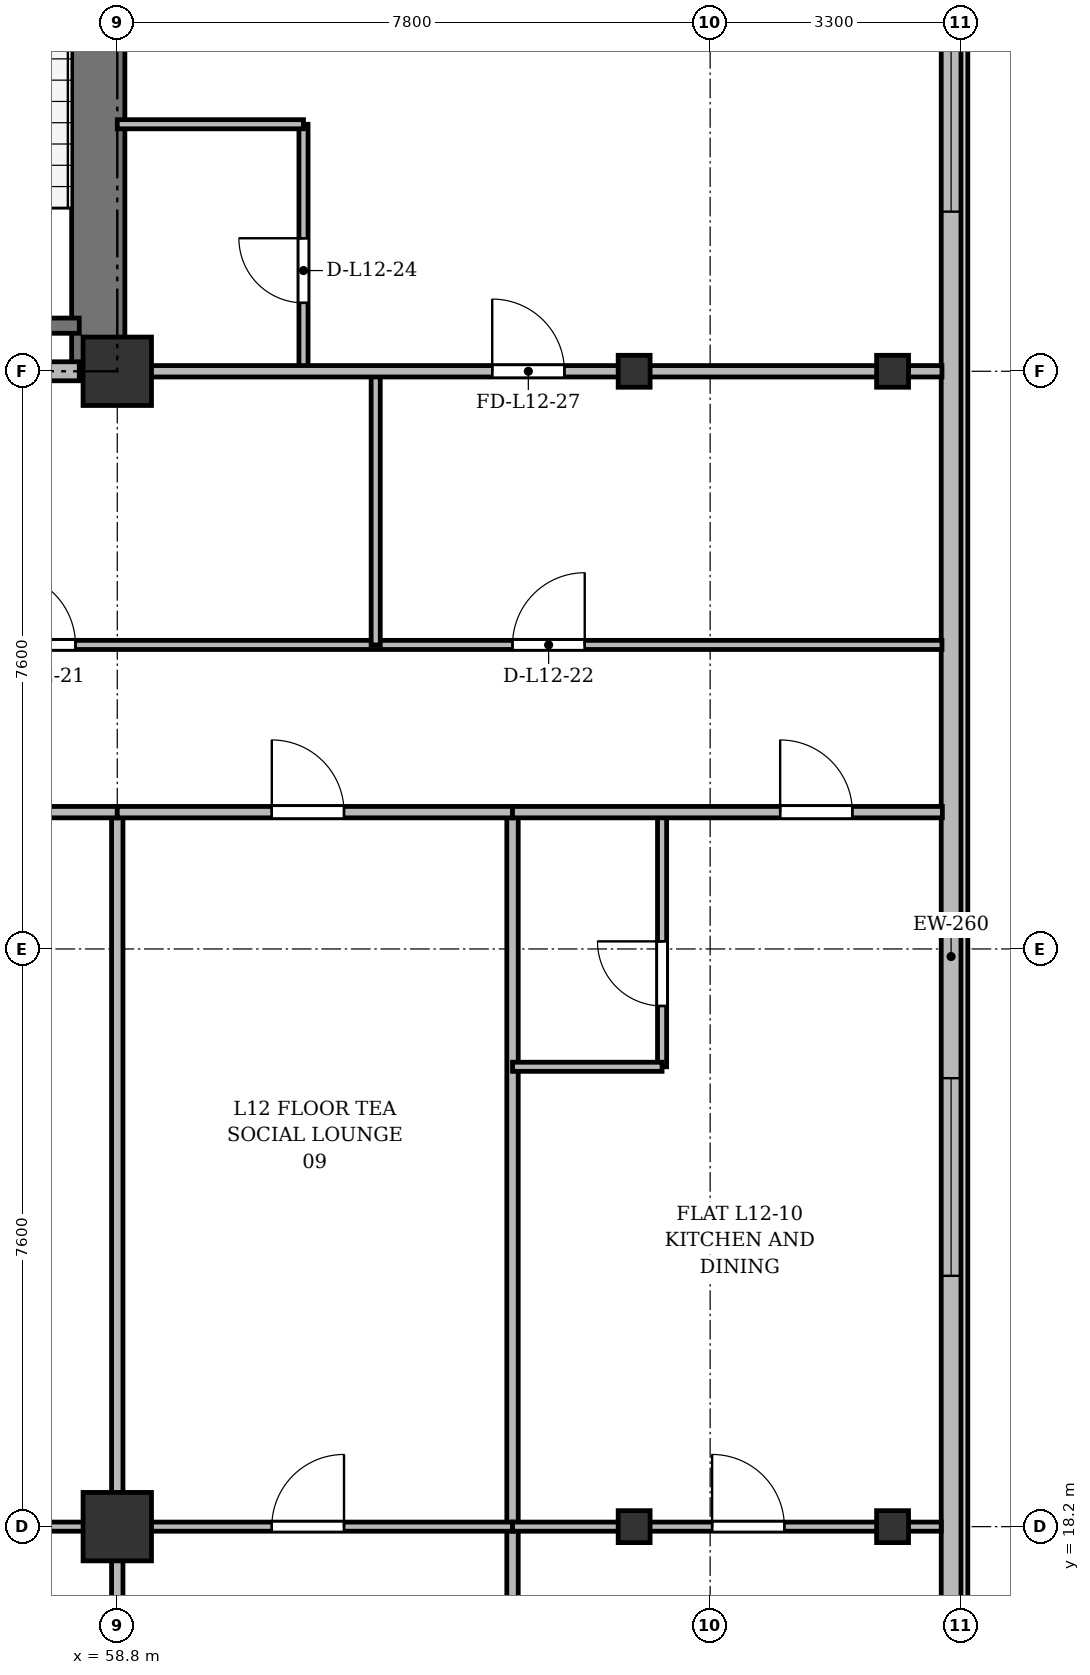
"""IFC4 building model, lengths in metres.
Left out: names, types, materials, properties, quantities, classifications, styles, units other than length and angle.
Written with IfcOpenShell. Run it as: python <this file> out.ifc"""

import sys

from ifc_helpers import new_model, si_unit, direction, frame, frame_2d, origin, origin_2d, place, context, subcontext, project, spatial, rectangle, i_section, extrude, source, transform, mapped, element, fill, save


model = new_model("IFC4")
c1 = context("Model", 3, precision=1e-05, world=origin(), true_north=direction((0.0, 1.0)))
c2 = subcontext(c1, "Body", "Model", "MODEL_VIEW")
j1 = project(units=[si_unit("LENGTHUNIT", "METRE"), si_unit("PLANEANGLEUNIT", "RADIAN")], contexts=[c1])
p1 = place(None, origin())
s1 = spatial("IfcSite", under=j1, at=p1, CompositionType="ELEMENT")
p2 = place(p1, origin())
s2 = spatial("IfcBuilding", under=s1, at=p2, CompositionType="ELEMENT")
p3 = place(p2, frame((0.0, 0.0, 48.7)))
s3 = spatial("IfcBuildingStorey", under=s2, at=p3, CompositionType="ELEMENT", Elevation=48.7)
m1 = source(origin(), c2, "Body", "SweptSolid", [
    extrude(rectangle(XDim=0.9, YDim=0.9, at=origin_2d()), origin(), (0.0, 0.0, 1.0), 3.6),
])
for number, where, z_axis, x_axis in (
    (1, (58.8, 18.2, 0.0), (0.0, 0.0, 1.0), (1.0, 0.0, 0.0)),
    (2, (58.8, 33.4, 0.0), (0.0, 0.0, 1.0), (1.0, 0.0, 0.0)),
):
    element("IfcColumn", number, at=place(p3, frame(where, z_axis=z_axis, x_axis=x_axis)), inside=s3, PredefinedType="COLUMN", context=c2, shape_type="MappedRepresentation", body=[
        mapped(m1, transform((0.0, 0.0, 0.0), x_axis=(1.0, 0.0, 0.0), y_axis=(0.0, 1.0, 0.0), z_axis=(0.0, 0.0, 1.0), scale=1.0)),
    ])
m2 = source(origin(), c2, "Body", "SweptSolid", [
    extrude(i_section(OverallWidth=0.42, OverallDepth=0.42, WebThickness=0.026, FlangeThickness=0.04, at=origin_2d()), origin(), (0.0, 0.0, 1.0), 3.6),
])
for number, where, z_axis, x_axis in (
    (3, (65.6, 18.2, 0.0), (0.0, 0.0, 1.0), (1.0, 0.0, 0.0)),
    (4, (65.6, 33.4, 0.0), (0.0, 0.0, 1.0), (1.0, 0.0, 0.0)),
    (5, (69.0, 18.2, 0.0), (0.0, 0.0, 1.0), (1.0, 0.0, 0.0)),
    (6, (69.0, 33.4, 0.0), (0.0, 0.0, 1.0), (1.0, 0.0, 0.0)),
):
    element("IfcColumn", number, at=place(p3, frame(where, z_axis=z_axis, x_axis=x_axis)), inside=s3, PredefinedType="COLUMN", context=c2, shape_type="MappedRepresentation", body=[
        mapped(m2, transform((0.0, 0.0, 0.0), x_axis=(1.0, 0.0, 0.0), y_axis=(0.0, 1.0, 0.0), z_axis=(0.0, 0.0, 1.0), scale=1.0)),
    ])
p4 = place(p3, frame((69.77, 45.5, 0.0), z_axis=(0.0, 0.0, 1.0), x_axis=(0.0, -1.0, 0.0)))
e7 = element("IfcWall", 7, at=p4, inside=s3, PredefinedType="SOLIDWALL", context=c2, shape_type="SweptSolid", body=[
    extrude(rectangle(XDim=39.6, YDim=0.26, at=frame_2d((19.8, 0.0))), origin(), (0.0, 0.0, 1.0), 3.34),
])
p5 = place(p4, frame((36.95, 0.0, 0.92)))
e8 = element("IfcOpeningElement", 8, at=p5, cuts=e7, PredefinedType="OPENING", context=c2, shape_type="SweptSolid", body=[
    extrude(rectangle(XDim=1.2, YDim=1.65, at=frame_2d((0.6, 0.825))), frame((0.0, 0.14, 0.0), z_axis=(0.0, -1.0, 0.0), x_axis=(1.0, 0.0, 0.0)), (0.0, 0.0, 1.0), 0.28),
])
p6 = place(p4, frame((32.8, 0.0, 0.92)))
e9 = element("IfcOpeningElement", 9, at=p6, cuts=e7, PredefinedType="OPENING", context=c2, shape_type="SweptSolid", body=[
    extrude(rectangle(XDim=2.6, YDim=1.9, at=frame_2d((1.3, 0.95))), frame((0.0, 0.14, 0.0), z_axis=(0.0, -1.0, 0.0), x_axis=(1.0, 0.0, 0.0)), (0.0, 0.0, 1.0), 0.28),
])
p7 = place(p4, frame((28.6, 0.0, 0.92)))
e10 = element("IfcOpeningElement", 10, at=p7, cuts=e7, PredefinedType="OPENING", context=c2, shape_type="SweptSolid", body=[
    extrude(rectangle(XDim=2.6, YDim=1.9, at=frame_2d((1.3, 0.95))), frame((0.0, 0.14, 0.0), z_axis=(0.0, -1.0, 0.0), x_axis=(1.0, 0.0, 0.0)), (0.0, 0.0, 1.0), 0.28),
])
p8 = place(p4, frame((21.4, 0.0, 0.92)))
e11 = element("IfcOpeningElement", 11, at=p8, cuts=e7, PredefinedType="OPENING", context=c2, shape_type="SweptSolid", body=[
    extrude(rectangle(XDim=2.6, YDim=1.9, at=frame_2d((1.3, 0.95))), frame((0.0, 0.14, 0.0), z_axis=(0.0, -1.0, 0.0), x_axis=(1.0, 0.0, 0.0)), (0.0, 0.0, 1.0), 0.28),
])
p9 = place(p4, frame((7.4, 0.0, 0.92)))
e12 = element("IfcOpeningElement", 12, at=p9, cuts=e7, PredefinedType="OPENING", context=c2, shape_type="SweptSolid", body=[
    extrude(rectangle(XDim=2.6, YDim=1.9, at=frame_2d((1.3, 0.95))), frame((0.0, 0.14, 0.0), z_axis=(0.0, -1.0, 0.0), x_axis=(1.0, 0.0, 0.0)), (0.0, 0.0, 1.0), 0.28),
])
p10 = place(p4, frame((4.5, 0.0, 0.92)))
e13 = element("IfcOpeningElement", 13, at=p10, cuts=e7, PredefinedType="OPENING", context=c2, shape_type="SweptSolid", body=[
    extrude(rectangle(XDim=1.2, YDim=1.65, at=frame_2d((0.6, 0.825))), frame((0.0, 0.14, 0.0), z_axis=(0.0, -1.0, 0.0), x_axis=(1.0, 0.0, 0.0)), (0.0, 0.0, 1.0), 0.28),
])
p11 = place(p4, frame((1.15, 0.0, 0.92)))
e14 = element("IfcOpeningElement", 14, at=p11, cuts=e7, PredefinedType="OPENING", context=c2, shape_type="SweptSolid", body=[
    extrude(rectangle(XDim=1.2, YDim=1.65, at=frame_2d((0.6, 0.825))), frame((0.0, 0.14, 0.0), z_axis=(0.0, -1.0, 0.0), x_axis=(1.0, 0.0, 0.0)), (0.0, 0.0, 1.0), 0.28),
])
p12 = place(p3, frame((58.55, 33.4, 0.0), z_axis=(0.0, 0.0, 1.0), x_axis=(0.0, 1.0, 0.0)))
e15 = element("IfcWall", 15, at=p12, inside=s3, PredefinedType="SHEAR", context=c2, shape_type="SweptSolid", body=[
    extrude(rectangle(XDim=11.7, YDim=0.7, at=frame_2d((5.85, 0.0))), origin(), (0.0, 0.0, 1.0), 3.34),
])
p13 = place(p3, frame((54.9, 34.0, 0.0), z_axis=(0.0, 0.0, 1.0), x_axis=(1.0, 0.0, 0.0)))
e16 = element("IfcWall", 16, at=p13, inside=s3, PredefinedType="SHEAR", context=c2, shape_type="SweptSolid", body=[
    extrude(rectangle(XDim=3.4, YDim=0.2, at=frame_2d((1.7, 0.0))), origin(), (0.0, 0.0, 1.0), 3.34),
])
p14 = place(p3, frame((47.15, 33.4, 0.0), z_axis=(0.0, 0.0, 1.0), x_axis=(1.0, 0.0, 0.0)))
e17 = element("IfcWall", 17, at=p14, inside=s3, PredefinedType="PARTITIONING", context=c2, shape_type="SweptSolid", body=[
    extrude(rectangle(XDim=11.15, YDim=0.25, at=frame_2d((5.575, 0.0))), origin(), (0.0, 0.0, 1.0), 2.69),
])
p15 = place(p14, frame((0.7, 0.0, 0.0)))
e18 = element("IfcOpeningElement", 18, at=p15, cuts=e17, PredefinedType="OPENING", context=c2, shape_type="SweptSolid", body=[
    extrude(rectangle(XDim=0.95, YDim=2.15, at=frame_2d((0.475, 1.075))), frame((0.0, 0.135, 0.0), z_axis=(0.0, -1.0, 0.0), x_axis=(1.0, 0.0, 0.0)), (0.0, 0.0, 1.0), 0.27),
])
p16 = place(p14, frame((6.0, 0.0, 0.0)))
e19 = element("IfcOpeningElement", 19, at=p16, cuts=e17, PredefinedType="OPENING", context=c2, shape_type="SweptSolid", body=[
    extrude(rectangle(XDim=1.2, YDim=2.15, at=frame_2d((0.6, 1.075))), frame((0.0, 0.135, 0.0), z_axis=(0.0, -1.0, 0.0), x_axis=(1.0, 0.0, 0.0)), (0.0, 0.0, 1.0), 0.27),
])
p17 = place(p3, frame((54.8, 29.8, 0.0), z_axis=(0.0, 0.0, 1.0), x_axis=(1.0, 0.0, 0.0)))
e20 = element("IfcWall", 20, at=p17, inside=s3, PredefinedType="PARTITIONING", context=c2, shape_type="SweptSolid", body=[
    extrude(rectangle(XDim=14.85, YDim=0.12, at=frame_2d((7.425, 0.0))), origin(), (0.0, 0.0, 1.0), 2.752),
])
p18 = place(p17, frame((2.5, 0.0, 0.0)))
e21 = element("IfcOpeningElement", 21, at=p18, cuts=e20, PredefinedType="OPENING", context=c2, shape_type="SweptSolid", body=[
    extrude(rectangle(XDim=0.95, YDim=2.15, at=frame_2d((0.475, 1.075))), frame((0.0, 0.07, 0.0), z_axis=(0.0, -1.0, 0.0), x_axis=(1.0, 0.0, 0.0)), (0.0, 0.0, 1.0), 0.14),
])
p19 = place(p17, frame((9.2, 0.0, 0.0)))
e22 = element("IfcOpeningElement", 22, at=p19, cuts=e20, PredefinedType="OPENING", context=c2, shape_type="SweptSolid", body=[
    extrude(rectangle(XDim=0.95, YDim=2.15, at=frame_2d((0.475, 1.075))), frame((0.0, 0.07, 0.0), z_axis=(0.0, -1.0, 0.0), x_axis=(1.0, 0.0, 0.0)), (0.0, 0.0, 1.0), 0.14),
])
p20 = place(p3, frame((62.2, 29.8, 0.0), z_axis=(0.0, 0.0, 1.0), x_axis=(0.0, 1.0, 0.0)))
e23 = element("IfcWall", 23, at=p20, inside=s3, PredefinedType="PARTITIONING", context=c2, shape_type="SweptSolid", body=[
    extrude(rectangle(XDim=3.6, YDim=0.12, at=frame_2d((1.8, 0.0))), origin(), (0.0, 0.0, 1.0), 2.69),
])
p21 = place(p3, frame((61.25, 33.4, 0.0), z_axis=(0.0, 0.0, 1.0), x_axis=(0.0, 1.0, 0.0)))
e24 = element("IfcWall", 24, at=p21, inside=s3, PredefinedType="PARTITIONING", context=c2, shape_type="SweptSolid", body=[
    extrude(rectangle(XDim=3.25, YDim=0.12, at=frame_2d((1.625, 0.0))), origin(), (0.0, 0.0, 1.0), 2.69),
])
p22 = place(p21, frame((0.9, 0.0, 0.0)))
e25 = element("IfcOpeningElement", 25, at=p22, cuts=e24, PredefinedType="OPENING", context=c2, shape_type="SweptSolid", body=[
    extrude(rectangle(XDim=0.85, YDim=2.1, at=frame_2d((0.425, 1.05))), frame((0.0, 0.07, 0.0), z_axis=(0.0, -1.0, 0.0), x_axis=(1.0, 0.0, 0.0)), (0.0, 0.0, 1.0), 0.14),
])
p23 = place(p3, frame((58.8, 36.65, 0.0), z_axis=(0.0, 0.0, 1.0), x_axis=(1.0, 0.0, 0.0)))
e26 = element("IfcWall", 26, at=p23, inside=s3, PredefinedType="PARTITIONING", context=c2, shape_type="SweptSolid", body=[
    extrude(rectangle(XDim=2.45, YDim=0.12, at=frame_2d((1.225, 0.0))), origin(), (0.0, 0.0, 1.0), 2.752),
])
p24 = place(p3, frame((58.8, 33.4, 0.0), z_axis=(0.0, 0.0, 1.0), x_axis=(1.0, 0.0, 0.0)))
e27 = element("IfcWall", 27, at=p24, inside=s3, PredefinedType="PARTITIONING", context=c2, shape_type="SweptSolid", body=[
    extrude(rectangle(XDim=10.85, YDim=0.15, at=frame_2d((5.425, 0.0))), origin(), (0.0, 0.0, 1.0), 2.69),
])
p25 = place(p24, frame((4.933, 0.0, 0.0)))
e28 = element("IfcOpeningElement", 28, at=p25, cuts=e27, PredefinedType="OPENING", context=c2, shape_type="SweptSolid", body=[
    extrude(rectangle(XDim=0.95, YDim=2.15, at=frame_2d((0.475, 1.075))), frame((0.0, 0.085, 0.0), z_axis=(0.0, -1.0, 0.0), x_axis=(1.0, 0.0, 0.0)), (0.0, 0.0, 1.0), 0.17),
])
p26 = place(p3, frame((58.8, 3.145, 0.0), z_axis=(0.0, 0.0, 1.0), x_axis=(0.0, 1.0, 0.0)))
e29 = element("IfcWall", 29, at=p26, inside=s3, PredefinedType="PARTITIONING", context=c2, shape_type="SweptSolid", body=[
    extrude(rectangle(XDim=24.455, YDim=0.15, at=frame_2d((12.228, 0.0))), origin(), (0.0, 0.0, 1.0), 2.752),
])
p27 = place(p3, frame((64.0, 3.145, 0.0), z_axis=(0.0, 0.0, 1.0), x_axis=(0.0, 1.0, 0.0)))
e30 = element("IfcWall", 30, at=p27, inside=s3, PredefinedType="PARTITIONING", context=c2, shape_type="SweptSolid", body=[
    extrude(rectangle(XDim=24.455, YDim=0.15, at=frame_2d((12.228, 0.0))), origin(), (0.0, 0.0, 1.0), 2.69),
])
p28 = place(p3, frame((51.0, 27.6, 0.0), z_axis=(0.0, 0.0, 1.0), x_axis=(1.0, 0.0, 0.0)))
e31 = element("IfcWall", 31, at=p28, inside=s3, PredefinedType="PARTITIONING", context=c2, shape_type="SweptSolid", body=[
    extrude(rectangle(XDim=7.8, YDim=0.15, at=frame_2d((3.9, 0.0))), origin(), (0.0, 0.0, 1.0), 2.752),
])
p29 = place(p28, frame((3.333, 0.0, 0.0)))
e32 = element("IfcOpeningElement", 32, at=p29, cuts=e31, PredefinedType="OPENING", context=c2, shape_type="SweptSolid", body=[
    extrude(rectangle(XDim=0.95, YDim=2.15, at=frame_2d((0.475, 1.075))), frame((0.0, 0.085, 0.0), z_axis=(0.0, -1.0, 0.0), x_axis=(1.0, 0.0, 0.0)), (0.0, 0.0, 1.0), 0.17),
])
p30 = place(p3, frame((51.0, 18.2, 0.0), z_axis=(0.0, 0.0, 1.0), x_axis=(1.0, 0.0, 0.0)))
e33 = element("IfcWall", 33, at=p30, inside=s3, PredefinedType="PARTITIONING", context=c2, shape_type="SweptSolid", body=[
    extrude(rectangle(XDim=7.8, YDim=0.12, at=frame_2d((3.9, 0.0))), origin(), (0.0, 0.0, 1.0), 2.69),
])
p31 = place(p30, frame((3.333, 0.0, 0.0)))
e34 = element("IfcOpeningElement", 34, at=p31, cuts=e33, PredefinedType="OPENING", context=c2, shape_type="SweptSolid", body=[
    extrude(rectangle(XDim=0.95, YDim=2.15, at=frame_2d((0.475, 1.075))), frame((0.0, 0.07, 0.0), z_axis=(0.0, -1.0, 0.0), x_axis=(1.0, 0.0, 0.0)), (0.0, 0.0, 1.0), 0.14),
])
p32 = place(p3, frame((58.8, 27.6, 0.0), z_axis=(0.0, 0.0, 1.0), x_axis=(1.0, 0.0, 0.0)))
e35 = element("IfcWall", 35, at=p32, inside=s3, PredefinedType="PARTITIONING", context=c2, shape_type="SweptSolid", body=[
    extrude(rectangle(XDim=5.2, YDim=0.15, at=frame_2d((2.6, 0.0))), origin(), (0.0, 0.0, 1.0), 2.752),
])
p33 = place(p32, frame((2.033, 0.0, 0.0)))
e36 = element("IfcOpeningElement", 36, at=p33, cuts=e35, PredefinedType="OPENING", context=c2, shape_type="SweptSolid", body=[
    extrude(rectangle(XDim=0.95, YDim=2.15, at=frame_2d((0.475, 1.075))), frame((0.0, 0.085, 0.0), z_axis=(0.0, -1.0, 0.0), x_axis=(1.0, 0.0, 0.0)), (0.0, 0.0, 1.0), 0.17),
])
p34 = place(p3, frame((58.8, 18.2, 0.0), z_axis=(0.0, 0.0, 1.0), x_axis=(1.0, 0.0, 0.0)))
e37 = element("IfcWall", 37, at=p34, inside=s3, PredefinedType="PARTITIONING", context=c2, shape_type="SweptSolid", body=[
    extrude(rectangle(XDim=5.2, YDim=0.12, at=frame_2d((2.6, 0.0))), origin(), (0.0, 0.0, 1.0), 2.69),
])
p35 = place(p34, frame((2.033, 0.0, 0.0)))
e38 = element("IfcOpeningElement", 38, at=p35, cuts=e37, PredefinedType="OPENING", context=c2, shape_type="SweptSolid", body=[
    extrude(rectangle(XDim=0.95, YDim=2.15, at=frame_2d((0.475, 1.075))), frame((0.0, 0.07, 0.0), z_axis=(0.0, -1.0, 0.0), x_axis=(1.0, 0.0, 0.0)), (0.0, 0.0, 1.0), 0.14),
])
p36 = place(p3, frame((64.0, 18.2, 0.0), z_axis=(0.0, 0.0, 1.0), x_axis=(1.0, 0.0, 0.0)))
e39 = element("IfcWall", 39, at=p36, inside=s3, PredefinedType="PARTITIONING", context=c2, shape_type="SweptSolid", body=[
    extrude(rectangle(XDim=5.64, YDim=0.12, at=frame_2d((2.82, 0.0))), origin(), (0.0, 0.0, 1.0), 2.69),
])
p37 = place(p36, frame((2.626, 0.0, 0.0)))
e40 = element("IfcOpeningElement", 40, at=p37, cuts=e39, PredefinedType="OPENING", context=c2, shape_type="SweptSolid", body=[
    extrude(rectangle(XDim=0.95, YDim=2.15, at=frame_2d((0.475, 1.075))), frame((0.0, 0.07, 0.0), z_axis=(0.0, -1.0, 0.0), x_axis=(1.0, 0.0, 0.0)), (0.0, 0.0, 1.0), 0.14),
])
p38 = place(p3, frame((65.968, 24.25, 0.0), z_axis=(0.0, 0.0, 1.0), x_axis=(0.0, 1.0, 0.0)))
e41 = element("IfcWall", 41, at=p38, inside=s3, PredefinedType="PARTITIONING", context=c2, shape_type="SweptSolid", body=[
    extrude(rectangle(XDim=3.35, YDim=0.12, at=frame_2d((1.675, 0.0))), origin(), (0.0, 0.0, 1.0), 2.94),
])
p39 = place(p38, frame((0.8, 0.0, 0.0)))
e42 = element("IfcOpeningElement", 42, at=p39, cuts=e41, PredefinedType="OPENING", context=c2, shape_type="SweptSolid", body=[
    extrude(rectangle(XDim=0.85, YDim=2.1, at=frame_2d((0.425, 1.05))), frame((0.0, 0.07, 0.0), z_axis=(0.0, -1.0, 0.0), x_axis=(1.0, 0.0, 0.0)), (0.0, 0.0, 1.0), 0.14),
])
p40 = place(p3, frame((64.0, 24.25, 0.0), z_axis=(0.0, 0.0, 1.0), x_axis=(1.0, 0.0, 0.0)))
e43 = element("IfcWall", 43, at=p40, inside=s3, PredefinedType="PARTITIONING", context=c2, shape_type="SweptSolid", body=[
    extrude(rectangle(XDim=1.968, YDim=0.12, at=frame_2d((0.984, 0.0))), origin(), (0.0, 0.0, 1.0), 2.752),
])
p41 = place(p3, frame((64.0, 27.6, 0.0), z_axis=(0.0, 0.0, 1.0), x_axis=(1.0, 0.0, 0.0)))
e44 = element("IfcWall", 44, at=p41, inside=s3, PredefinedType="PARTITIONING", context=c2, shape_type="SweptSolid", body=[
    extrude(rectangle(XDim=5.655, YDim=0.15, at=frame_2d((2.828, 0.0))), origin(), (0.0, 0.0, 1.0), 2.752),
])
p42 = place(p41, frame((3.521, 0.0, 0.0)))
e45 = element("IfcOpeningElement", 45, at=p42, cuts=e44, PredefinedType="OPENING", context=c2, shape_type="SweptSolid", body=[
    extrude(rectangle(XDim=0.95, YDim=2.15, at=frame_2d((0.475, 1.075))), frame((0.0, 0.085, 0.0), z_axis=(0.0, -1.0, 0.0), x_axis=(1.0, 0.0, 0.0)), (0.0, 0.0, 1.0), 0.17),
])
m3 = source(origin(), c2, "Body", "SweptSolid", [
    extrude(rectangle(XDim=2.6, YDim=1.9, at=frame_2d((1.3, 0.95))), frame((0.0, 0.03, 0.0), z_axis=(0.0, -1.0, 0.0), x_axis=(1.0, 0.0, 0.0)), (0.0, 0.0, 1.0), 0.06),
])
p43 = place(p8, origin())
e46 = element("IfcWindow", 46, at=p43, inside=s3, PartitioningType="SINGLE_PANEL", PredefinedType="WINDOW", context=c2, shape_type="MappedRepresentation", body=[
    mapped(m3, transform((0.0, 0.0, 0.0), x_axis=(1.0, 0.0, 0.0), y_axis=(0.0, 1.0, 0.0), z_axis=(0.0, 0.0, 1.0), scale=1.0)),
])
fill(e11, e46)
p44 = place(p9, origin())
e47 = element("IfcWindow", 47, at=p44, inside=s3, PartitioningType="SINGLE_PANEL", PredefinedType="WINDOW", context=c2, shape_type="MappedRepresentation", body=[
    mapped(m3, transform((0.0, 0.0, 0.0), x_axis=(1.0, 0.0, 0.0), y_axis=(0.0, 1.0, 0.0), z_axis=(0.0, 0.0, 1.0), scale=1.0)),
])
fill(e12, e47)
m4 = source(origin(), c2, "Body", "SweptSolid", [
    extrude(rectangle(XDim=0.95, YDim=2.15, at=frame_2d((0.475, 1.075))), frame((0.0, 0.025, 0.0), z_axis=(0.0, -1.0, 0.0), x_axis=(1.0, 0.0, 0.0)), (0.0, 0.0, 1.0), 0.05),
])
p45 = place(p18, origin())
e48 = element("IfcDoor", 48, at=p45, inside=s3, OperationType="SINGLE_SWING_LEFT", PredefinedType="DOOR", context=c2, shape_type="MappedRepresentation", body=[
    mapped(m4, transform((0.0, 0.0, 0.0), x_axis=(1.0, 0.0, 0.0), y_axis=(0.0, 1.0, 0.0), z_axis=(0.0, 0.0, 1.0), scale=1.0)),
])
fill(e21, e48)
p46 = place(p19, origin())
e49 = element("IfcDoor", 49, at=p46, inside=s3, OperationType="SINGLE_SWING_RIGHT", PredefinedType="DOOR", context=c2, shape_type="MappedRepresentation", body=[
    mapped(m4, transform((0.0, 0.0, 0.0), x_axis=(1.0, 0.0, 0.0), y_axis=(0.0, 1.0, 0.0), z_axis=(0.0, 0.0, 1.0), scale=1.0)),
])
fill(e22, e49)
m5 = source(origin(), c2, "Body", "SweptSolid", [
    extrude(rectangle(XDim=0.85, YDim=2.1, at=frame_2d((0.425, 1.05))), frame((0.0, 0.025, 0.0), z_axis=(0.0, -1.0, 0.0), x_axis=(1.0, 0.0, 0.0)), (0.0, 0.0, 1.0), 0.05),
])
p47 = place(p22, origin())
e50 = element("IfcDoor", 50, at=p47, inside=s3, OperationType="SINGLE_SWING_RIGHT", PredefinedType="DOOR", context=c2, shape_type="MappedRepresentation", body=[
    mapped(m5, transform((0.0, 0.0, 0.0), x_axis=(1.0, 0.0, 0.0), y_axis=(0.0, 1.0, 0.0), z_axis=(0.0, 0.0, 1.0), scale=1.0)),
])
fill(e25, e50)
p48 = place(p25, origin())
e51 = element("IfcDoor", 51, at=p48, inside=s3, OperationType="SINGLE_SWING_LEFT", PredefinedType="DOOR", context=c2, shape_type="MappedRepresentation", body=[
    mapped(m4, transform((0.0, 0.0, 0.0), x_axis=(1.0, 0.0, 0.0), y_axis=(0.0, 1.0, 0.0), z_axis=(0.0, 0.0, 1.0), scale=1.0)),
])
fill(e28, e51)
p49 = place(p33, origin())
e52 = element("IfcDoor", 52, at=p49, inside=s3, OperationType="SINGLE_SWING_LEFT", PredefinedType="DOOR", context=c2, shape_type="MappedRepresentation", body=[
    mapped(m4, transform((0.0, 0.0, 0.0), x_axis=(1.0, 0.0, 0.0), y_axis=(0.0, 1.0, 0.0), z_axis=(0.0, 0.0, 1.0), scale=1.0)),
])
fill(e36, e52)
p50 = place(p35, origin())
e53 = element("IfcDoor", 53, at=p50, inside=s3, OperationType="SINGLE_SWING_RIGHT", PredefinedType="DOOR", context=c2, shape_type="MappedRepresentation", body=[
    mapped(m4, transform((0.0, 0.0, 0.0), x_axis=(1.0, 0.0, 0.0), y_axis=(0.0, 1.0, 0.0), z_axis=(0.0, 0.0, 1.0), scale=1.0)),
])
fill(e38, e53)
p51 = place(p37, origin())
e54 = element("IfcDoor", 54, at=p51, inside=s3, OperationType="SINGLE_SWING_LEFT", PredefinedType="DOOR", context=c2, shape_type="MappedRepresentation", body=[
    mapped(m4, transform((0.0, 0.0, 0.0), x_axis=(1.0, 0.0, 0.0), y_axis=(0.0, 1.0, 0.0), z_axis=(0.0, 0.0, 1.0), scale=1.0)),
])
fill(e40, e54)
p52 = place(p39, origin())
e55 = element("IfcDoor", 55, at=p52, inside=s3, OperationType="SINGLE_SWING_RIGHT", PredefinedType="DOOR", context=c2, shape_type="MappedRepresentation", body=[
    mapped(m5, transform((0.0, 0.0, 0.0), x_axis=(1.0, 0.0, 0.0), y_axis=(0.0, 1.0, 0.0), z_axis=(0.0, 0.0, 1.0), scale=1.0)),
])
fill(e42, e55)
p53 = place(p42, origin())
e56 = element("IfcDoor", 56, at=p53, inside=s3, OperationType="SINGLE_SWING_LEFT", PredefinedType="DOOR", context=c2, shape_type="MappedRepresentation", body=[
    mapped(m4, transform((0.0, 0.0, 0.0), x_axis=(1.0, 0.0, 0.0), y_axis=(0.0, 1.0, 0.0), z_axis=(0.0, 0.0, 1.0), scale=1.0)),
])
fill(e45, e56)
save(model, sys.argv[1])
